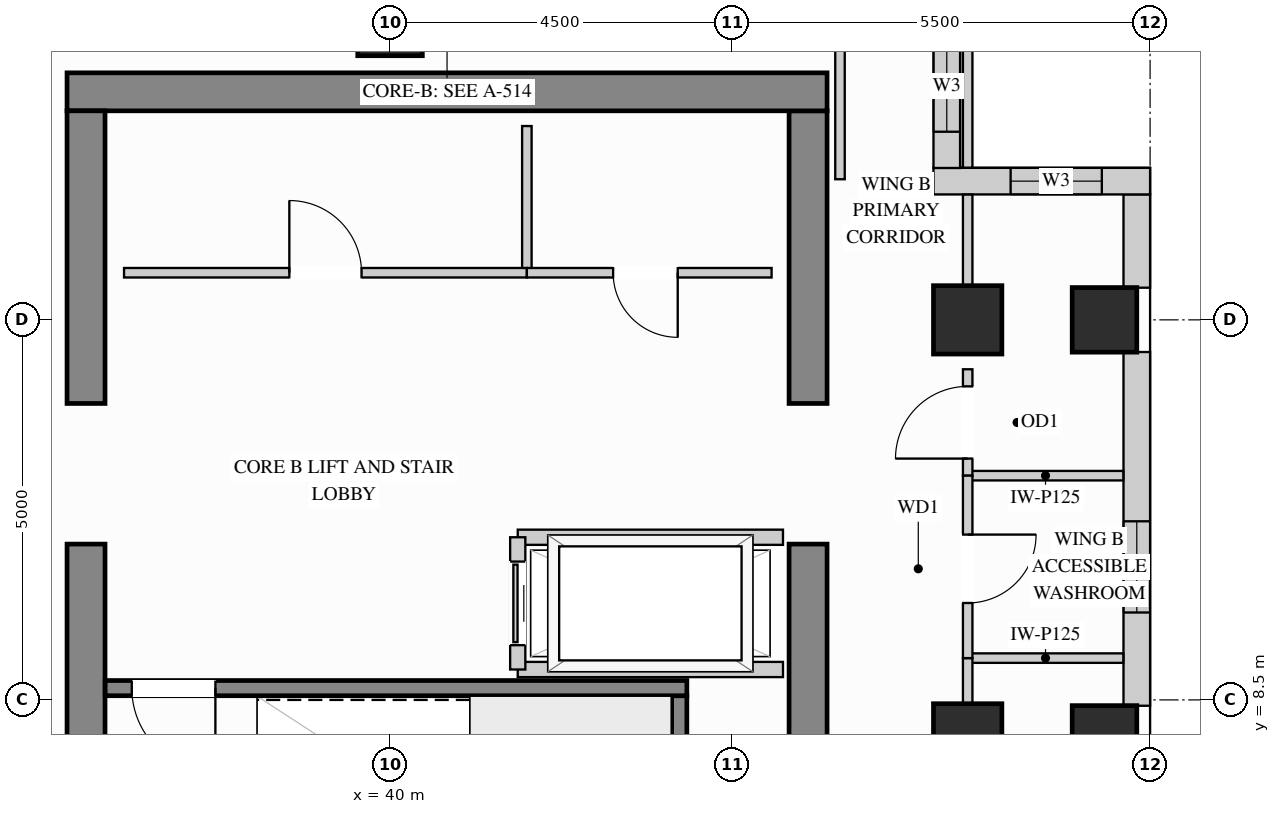
"""IFC4 building model, lengths in metres.
Left out: names, types, materials, properties, quantities, classifications, styles, units other than length and angle.
Written with IfcOpenShell. Run it as: python <this file> out.ifc"""

import sys

from ifc_helpers import new_model, si_unit, direction, frame, frame_2d, origin, origin_2d, place, context, subcontext, project, spatial, rectangle, extrude, source, transform, mapped, element, fill, save


model = new_model("IFC4")
c1 = context("Model", 3, precision=1e-05, world=origin(), true_north=direction((0.0, 1.0)))
c2 = subcontext(c1, "Body", "Model", "MODEL_VIEW")
j1 = project(units=[si_unit("LENGTHUNIT", "METRE"), si_unit("PLANEANGLEUNIT", "RADIAN")], contexts=[c1])
p1 = place(None, origin())
s1 = spatial("IfcSite", under=j1, at=p1, CompositionType="ELEMENT")
p2 = place(p1, origin())
s2 = spatial("IfcBuilding", under=s1, at=p2, CompositionType="ELEMENT")
p3 = place(p2, frame((0.0, 0.0, 219.6)))
s3 = spatial("IfcBuildingStorey", under=s2, at=p3, CompositionType="ELEMENT", Elevation=219.6)
m1 = source(origin(), c2, "Body", "SweptSolid", [
    extrude(rectangle(XDim=0.9, YDim=0.9, at=origin_2d()), origin(), (0.0, 0.0, 1.0), 3.4),
])
for number, where, z_axis, x_axis in (
    (1, (47.6, 13.5, 0.0), (0.0, 0.0, 1.0), (1.0, 0.0, 0.0)),
    (2, (47.6, 8.0, 0.0), (0.0, 0.0, 1.0), (1.0, 0.0, 0.0)),
):
    element("IfcColumn", number, at=place(p3, frame(where, z_axis=z_axis, x_axis=x_axis)), inside=s3, PredefinedType="COLUMN", context=c2, shape_type="MappedRepresentation", body=[
        mapped(m1, transform((0.0, 0.0, 0.0), x_axis=(1.0, 0.0, 0.0), y_axis=(0.0, 1.0, 0.0), z_axis=(0.0, 0.0, 1.0))),
    ])
m2 = source(origin(), c2, "Body", "SweptSolid", [
    extrude(rectangle(XDim=0.85, YDim=0.85, at=origin_2d()), origin(), (0.0, 0.0, 1.0), 3.4),
])
for number, where, z_axis, x_axis in (
    (3, (40.0, 17.4, 0.0), (0.0, 0.0, 1.0), (1.0, 0.0, 0.0)),
    (4, (49.4, 13.5, 0.0), (0.0, 0.0, 1.0), (1.0, 0.0, 0.0)),
    (5, (49.4, 8.0, 0.0), (0.0, 0.0, 1.0), (1.0, 0.0, 0.0)),
):
    element("IfcColumn", number, at=place(p3, frame(where, z_axis=z_axis, x_axis=x_axis)), inside=s3, PredefinedType="COLUMN", context=c2, shape_type="MappedRepresentation", body=[
        mapped(m2, transform((0.0, 0.0, 0.0), x_axis=(1.0, 0.0, 0.0), y_axis=(0.0, 1.0, 0.0), z_axis=(0.0, 0.0, 1.0))),
    ])
m3 = source(origin(), c2, "Body", "SweptSolid", [
    extrude(rectangle(XDim=5.8, YDim=0.5, at=frame_2d((2.9, 0.0))), origin(), (0.0, 0.0, 1.0), 3.4),
])
p4 = place(p3, frame((45.5, 4.75, 0.0), z_axis=(0.0, 0.0, 1.0), x_axis=(0.0, 1.0, 0.0)))
e6 = element("IfcWall", 6, at=p4, inside=s3, PredefinedType="SHEAR", context=c2, shape_type="MappedRepresentation", body=[
    mapped(m3, transform((0.0, 0.0, 0.0), x_axis=(1.0, 0.0, 0.0), y_axis=(0.0, 1.0, 0.0), z_axis=(0.0, 0.0, 1.0))),
])
m4 = source(origin(), c2, "Body", "SweptSolid", [
    extrude(rectangle(XDim=3.85, YDim=0.5, at=frame_2d((1.925, 0.0))), origin(), (0.0, 0.0, 1.0), 3.4),
])
p5 = place(p3, frame((45.5, 12.4, 0.0), z_axis=(0.0, 0.0, 1.0), x_axis=(0.0, 1.0, 0.0)))
e7 = element("IfcWall", 7, at=p5, inside=s3, PredefinedType="SHEAR", context=c2, shape_type="MappedRepresentation", body=[
    mapped(m4, transform((0.0, 0.0, 0.0), x_axis=(1.0, 0.0, 0.0), y_axis=(0.0, 1.0, 0.0), z_axis=(0.0, 0.0, 1.0))),
])
m5 = source(origin(), c2, "Body", "SweptSolid", [
    extrude(rectangle(XDim=10.0, YDim=0.5, at=frame_2d((5.0, 0.0))), origin(), (0.0, 0.0, 1.0), 3.4),
])
p6 = place(p3, frame((35.75, 16.5, 0.0), z_axis=(0.0, 0.0, 1.0), x_axis=(1.0, 0.0, 0.0)))
e8 = element("IfcWall", 8, at=p6, inside=s3, PredefinedType="SHEAR", context=c2, shape_type="MappedRepresentation", body=[
    mapped(m5, transform((0.0, 0.0, 0.0), x_axis=(1.0, 0.0, 0.0), y_axis=(0.0, 1.0, 0.0), z_axis=(0.0, 0.0, 1.0))),
])
p7 = place(p3, frame((36.0, 4.75, 0.0), z_axis=(0.0, 0.0, 1.0), x_axis=(0.0, 1.0, 0.0)))
e9 = element("IfcWall", 9, at=p7, inside=s3, PredefinedType="SHEAR", context=c2, shape_type="MappedRepresentation", body=[
    mapped(m3, transform((0.0, 0.0, 0.0), x_axis=(1.0, 0.0, 0.0), y_axis=(0.0, 1.0, 0.0), z_axis=(0.0, 0.0, 1.0))),
])
p8 = place(p3, frame((36.0, 12.4, 0.0), z_axis=(0.0, 0.0, 1.0), x_axis=(0.0, 1.0, 0.0)))
e10 = element("IfcWall", 10, at=p8, inside=s3, PredefinedType="SHEAR", context=c2, shape_type="MappedRepresentation", body=[
    mapped(m4, transform((0.0, 0.0, 0.0), x_axis=(1.0, 0.0, 0.0), y_axis=(0.0, 1.0, 0.0), z_axis=(0.0, 0.0, 1.0))),
])
p9 = place(p3, frame((49.825, 8.423, 0.0), z_axis=(0.0, 0.0, 1.0), x_axis=(0.0, 1.0, 0.0)))
e11 = element("IfcWall", 11, at=p9, inside=s3, PredefinedType="SOLIDWALL", context=c2, shape_type="SweptSolid", body=[
    extrude(rectangle(XDim=4.654, YDim=0.35, at=frame_2d((2.327, 0.0))), origin(), (0.0, 0.0, 1.0), 3.385),
])
p10 = place(p9, frame((1.227, 0.0, 0.78)))
e12 = element("IfcOpeningElement", 12, at=p10, cuts=e11, PredefinedType="OPENING", context=c2, shape_type="SweptSolid", body=[
    extrude(rectangle(XDim=1.2, YDim=2.1, at=frame_2d((0.6, 1.05))), frame((0.0, 0.185, 0.0), z_axis=(0.0, -1.0, 0.0), x_axis=(1.0, 0.0, 0.0)), (0.0, 0.0, 1.0), 0.37),
])
m6 = source(origin(), c2, "Body", "SweptSolid", [
    extrude(rectangle(XDim=1.229, YDim=0.35, at=frame_2d((0.615, 0.0))), origin(), (0.0, 0.0, 1.0), 3.385),
])
p11 = place(p3, frame((49.825, 13.923, 0.0), z_axis=(0.0, 0.0, 1.0), x_axis=(0.0, 1.0, 0.0)))
e13 = element("IfcWall", 13, at=p11, inside=s3, PredefinedType="SOLIDWALL", context=c2, shape_type="MappedRepresentation", body=[
    mapped(m6, transform((0.0, 0.0, 0.0), x_axis=(1.0, 0.0, 0.0), y_axis=(0.0, 1.0, 0.0), z_axis=(0.0, 0.0, 1.0))),
])
p12 = place(p3, frame((50.0, 15.325, 0.0), z_axis=(0.0, 0.0, 1.0), x_axis=(-1.0, 0.0, 0.0)))
e14 = element("IfcWall", 14, at=p12, inside=s3, PredefinedType="SOLIDWALL", context=c2, shape_type="SweptSolid", body=[
    extrude(rectangle(XDim=2.85, YDim=0.35, at=frame_2d((1.425, 0.0))), origin(), (0.0, 0.0, 1.0), 3.385),
])
p13 = place(p12, frame((0.635, 0.0, 0.78)))
e15 = element("IfcOpeningElement", 15, at=p13, cuts=e14, PredefinedType="OPENING", context=c2, shape_type="SweptSolid", body=[
    extrude(rectangle(XDim=1.2, YDim=2.1, at=frame_2d((0.6, 1.05))), frame((0.0, 0.185, 0.0), z_axis=(0.0, -1.0, 0.0), x_axis=(1.0, 0.0, 0.0)), (0.0, 0.0, 1.0), 0.37),
])
p14 = place(p3, frame((47.325, 15.498, 0.0), z_axis=(0.0, 0.0, 1.0), x_axis=(0.0, 1.0, 0.0)))
e16 = element("IfcWall", 16, at=p14, inside=s3, PredefinedType="SOLIDWALL", context=c2, shape_type="SweptSolid", body=[
    extrude(rectangle(XDim=2.154, YDim=0.35, at=frame_2d((1.077, 0.0))), origin(), (0.0, 0.0, 1.0), 3.385),
])
p15 = place(p14, frame((0.477, 0.0, 0.78)))
e17 = element("IfcOpeningElement", 17, at=p15, cuts=e16, PredefinedType="OPENING", context=c2, shape_type="SweptSolid", body=[
    extrude(rectangle(XDim=1.2, YDim=2.1, at=frame_2d((0.6, 1.05))), frame((0.0, 0.185, 0.0), z_axis=(0.0, -1.0, 0.0), x_axis=(1.0, 0.0, 0.0)), (0.0, 0.0, 1.0), 0.37),
])
m7 = source(origin(), c2, "Body", "SweptSolid", [
    extrude(rectangle(XDim=1.93, YDim=0.125, at=frame_2d((0.965, 0.0))), origin(), (0.0, 0.0, 1.0), 3.385),
])
p16 = place(p3, frame((41.8, 14.12, 0.0), z_axis=(0.0, 0.0, 1.0), x_axis=(0.0, 1.0, 0.0)))
e18 = element("IfcWall", 18, at=p16, inside=s3, PredefinedType="PARTITIONING", context=c2, shape_type="MappedRepresentation", body=[
    mapped(m7, transform((0.0, 0.0, 0.0), x_axis=(1.0, 0.0, 0.0), y_axis=(0.0, 1.0, 0.0), z_axis=(0.0, 0.0, 1.0))),
])
p17 = place(p3, frame((36.5, 14.12, 0.0), z_axis=(0.0, 0.0, 1.0), x_axis=(1.0, 0.0, 0.0)))
e19 = element("IfcWall", 19, at=p17, inside=s3, PredefinedType="PARTITIONING", context=c2, shape_type="SweptSolid", body=[
    extrude(rectangle(XDim=5.3, YDim=0.125, at=frame_2d((2.65, 0.0))), origin(), (0.0, 0.0, 1.0), 3.385),
])
p18 = place(p17, frame((2.175, 0.0, 0.0)))
e20 = element("IfcOpeningElement", 20, at=p18, cuts=e19, PredefinedType="OPENING", context=c2, shape_type="SweptSolid", body=[
    extrude(rectangle(XDim=0.95, YDim=2.15, at=frame_2d((0.475, 1.075))), frame((0.0, 0.073, 0.0), z_axis=(0.0, -1.0, 0.0), x_axis=(1.0, 0.0, 0.0)), (0.0, 0.0, 1.0), 0.145),
])
p19 = place(p3, frame((41.8, 14.12, 0.0), z_axis=(0.0, 0.0, 1.0), x_axis=(1.0, 0.0, 0.0)))
e21 = element("IfcWall", 21, at=p19, inside=s3, PredefinedType="PARTITIONING", context=c2, shape_type="SweptSolid", body=[
    extrude(rectangle(XDim=3.22, YDim=0.125, at=frame_2d((1.61, 0.0))), origin(), (0.0, 0.0, 1.0), 3.385),
])
p20 = place(p19, frame((1.135, 0.0, 0.0)))
e22 = element("IfcOpeningElement", 22, at=p20, cuts=e21, PredefinedType="OPENING", context=c2, shape_type="SweptSolid", body=[
    extrude(rectangle(XDim=0.85, YDim=2.1, at=frame_2d((0.425, 1.05))), frame((0.0, 0.073, 0.0), z_axis=(0.0, -1.0, 0.0), x_axis=(1.0, 0.0, 0.0)), (0.0, 0.0, 1.0), 0.145),
])
m8 = source(origin(), c2, "Body", "SweptSolid", [
    extrude(rectangle(XDim=2.048, YDim=0.125, at=frame_2d((1.024, 0.0))), origin(), (0.0, 0.0, 1.0), 3.385),
])
for number, where, z_axis, x_axis in (
    (23, (47.6, 11.45, 0.0), (0.0, 0.0, 1.0), (1.0, 0.0, 0.0)),
    (24, (47.6, 9.05, 0.0), (0.0, 0.0, 1.0), (1.0, 0.0, 0.0)),
):
    element("IfcWall", number, at=place(p3, frame(where, z_axis=z_axis, x_axis=x_axis)), inside=s3, PredefinedType="PARTITIONING", context=c2, shape_type="MappedRepresentation", body=[
        mapped(m8, transform((0.0, 0.0, 0.0), x_axis=(1.0, 0.0, 0.0), y_axis=(0.0, 1.0, 0.0), z_axis=(0.0, 0.0, 1.0))),
    ])
m9 = source(origin(), c2, "Body", "SweptSolid", [
    extrude(rectangle(XDim=0.6, YDim=0.125, at=frame_2d((0.3, 0.0))), origin(), (0.0, 0.0, 1.0), 2.773),
])
p21 = place(p3, frame((47.6, 8.45, 0.0), z_axis=(0.0, 0.0, 1.0), x_axis=(0.0, 1.0, 0.0)))
e25 = element("IfcWall", 25, at=p21, inside=s3, PredefinedType="PARTITIONING", context=c2, shape_type="MappedRepresentation", body=[
    mapped(m9, transform((0.0, 0.0, 0.0), x_axis=(1.0, 0.0, 0.0), y_axis=(0.0, 1.0, 0.0), z_axis=(0.0, 0.0, 1.0))),
])
p22 = place(p3, frame((47.6, 11.45, 0.0), z_axis=(0.0, 0.0, 1.0), x_axis=(0.0, 1.0, 0.0)))
e26 = element("IfcWall", 26, at=p22, inside=s3, PredefinedType="PARTITIONING", context=c2, shape_type="SweptSolid", body=[
    extrude(rectangle(XDim=1.4, YDim=0.125, at=frame_2d((0.7, 0.0))), origin(), (0.0, 0.0, 1.0), 2.773),
])
p23 = place(p22, frame((0.225, 0.0, 0.0)))
e27 = element("IfcOpeningElement", 27, at=p23, cuts=e26, PredefinedType="OPENING", context=c2, shape_type="SweptSolid", body=[
    extrude(rectangle(XDim=0.95, YDim=2.15, at=frame_2d((0.475, 1.075))), frame((0.0, 0.073, 0.0), z_axis=(0.0, -1.0, 0.0), x_axis=(1.0, 0.0, 0.0)), (0.0, 0.0, 1.0), 0.145),
])
m10 = source(origin(), c2, "Body", "SweptSolid", [
    extrude(rectangle(XDim=1.198, YDim=0.125, at=frame_2d((0.599, 0.0))), origin(), (0.0, 0.0, 1.0), 3.385),
])
p24 = place(p3, frame((47.6, 13.95, 0.0), z_axis=(0.0, 0.0, 1.0), x_axis=(0.0, 1.0, 0.0)))
e28 = element("IfcWall", 28, at=p24, inside=s3, PredefinedType="PARTITIONING", context=c2, shape_type="MappedRepresentation", body=[
    mapped(m10, transform((0.0, 0.0, 0.0), x_axis=(1.0, 0.0, 0.0), y_axis=(0.0, 1.0, 0.0), z_axis=(0.0, 0.0, 1.0))),
])
m11 = source(origin(), c2, "Body", "SweptSolid", [
    extrude(rectangle(XDim=2.148, YDim=0.125, at=frame_2d((1.074, 0.0))), origin(), (0.0, 0.0, 1.0), 3.385),
])
p25 = place(p3, frame((47.6, 15.502, 0.0), z_axis=(0.0, 0.0, 1.0), x_axis=(0.0, 1.0, 0.0)))
e29 = element("IfcWall", 29, at=p25, inside=s3, PredefinedType="PARTITIONING", context=c2, shape_type="MappedRepresentation", body=[
    mapped(m11, transform((0.0, 0.0, 0.0), x_axis=(1.0, 0.0, 0.0), y_axis=(0.0, 1.0, 0.0), z_axis=(0.0, 0.0, 1.0))),
])
p26 = place(p3, frame((47.6, 9.05, 0.0), z_axis=(0.0, 0.0, 1.0), x_axis=(0.0, 1.0, 0.0)))
e30 = element("IfcWall", 30, at=p26, inside=s3, PredefinedType="PARTITIONING", context=c2, shape_type="SweptSolid", body=[
    extrude(rectangle(XDim=2.4, YDim=0.125, at=frame_2d((1.2, 0.0))), origin(), (0.0, 0.0, 1.0), 2.773),
])
p27 = place(p26, frame((0.725, 0.0, 0.0)))
e31 = element("IfcOpeningElement", 31, at=p27, cuts=e30, PredefinedType="OPENING", context=c2, shape_type="SweptSolid", body=[
    extrude(rectangle(XDim=0.9, YDim=2.15, at=frame_2d((0.45, 1.075))), frame((0.0, 0.073, 0.0), z_axis=(0.0, -1.0, 0.0), x_axis=(1.0, 0.0, 0.0)), (0.0, 0.0, 1.0), 0.145),
])
m12 = source(origin(), c2, "Body", "SweptSolid", [
    extrude(rectangle(XDim=2.298, YDim=0.125, at=frame_2d((1.149, 0.0))), origin(), (0.0, 0.0, 1.0), 3.385),
])
p28 = place(p3, frame((45.92, 15.35, 0.0), z_axis=(0.0, 0.0, 1.0), x_axis=(0.0, 1.0, 0.0)))
e32 = element("IfcWall", 32, at=p28, inside=s3, PredefinedType="PARTITIONING", context=c2, shape_type="MappedRepresentation", body=[
    mapped(m12, transform((0.0, 0.0, 0.0), x_axis=(1.0, 0.0, 0.0), y_axis=(0.0, 1.0, 0.0), z_axis=(0.0, 0.0, 1.0))),
])
m13 = source(origin(), c2, "Body", "SweptSolid", [
    extrude(rectangle(XDim=3.49, YDim=0.2, at=frame_2d((1.745, 0.0))), origin(), (0.0, 0.0, 1.0), 3.385),
])
for number, where, z_axis, x_axis in (
    (33, (41.68, 10.64, 0.0), (0.0, 0.0, 1.0), (1.0, 0.0, 0.0)),
    (34, (41.68, 8.9, 0.0), (0.0, 0.0, 1.0), (1.0, 0.0, 0.0)),
):
    element("IfcWall", number, at=place(p3, frame(where, z_axis=z_axis, x_axis=x_axis)), inside=s3, PredefinedType="PARTITIONING", context=c2, shape_type="MappedRepresentation", body=[
        mapped(m13, transform((0.0, 0.0, 0.0), x_axis=(1.0, 0.0, 0.0), y_axis=(0.0, 1.0, 0.0), z_axis=(0.0, 0.0, 1.0))),
    ])
p29 = place(p3, frame((41.68, 8.9, 0.0), z_axis=(0.0, 0.0, 1.0), x_axis=(0.0, 1.0, 0.0)))
e35 = element("IfcWall", 35, at=p29, inside=s3, PredefinedType="PARTITIONING", context=c2, shape_type="SweptSolid", body=[
    extrude(rectangle(XDim=1.74, YDim=0.2, at=frame_2d((0.87, 0.0))), origin(), (0.0, 0.0, 1.0), 3.385),
])
p30 = place(p29, frame((0.32, 0.0, 0.0)))
e36 = element("IfcOpeningElement", 36, at=p30, cuts=e35, PredefinedType="OPENING", context=c2, shape_type="SweptSolid", body=[
    extrude(rectangle(XDim=1.1, YDim=2.2, at=frame_2d((0.55, 1.1))), frame((0.0, 0.11, 0.0), z_axis=(0.0, -1.0, 0.0), x_axis=(1.0, 0.0, 0.0)), (0.0, 0.0, 1.0), 0.22),
])
m14 = source(origin(), c2, "Body", "SweptSolid", [
    extrude(rectangle(XDim=3.803, YDim=0.2, at=frame_2d((1.901, 0.0))), origin(), (0.0, 0.0, 1.0), 3.4),
])
p31 = place(p3, frame((43.805, 4.752, 0.0), z_axis=(0.0, 0.0, 1.0), x_axis=(0.0, 1.0, 0.0)))
e37 = element("IfcWall", 37, at=p31, inside=s3, PredefinedType="SHEAR", context=c2, shape_type="MappedRepresentation", body=[
    mapped(m14, transform((0.0, 0.0, 0.0), x_axis=(1.0, 0.0, 0.0), y_axis=(0.0, 1.0, 0.0), z_axis=(0.0, 0.0, 1.0))),
])
p32 = place(p3, frame((36.252, 8.655, 0.0), z_axis=(0.0, 0.0, 1.0), x_axis=(1.0, 0.0, 0.0)))
e38 = element("IfcWall", 38, at=p32, inside=s3, PredefinedType="SHEAR", context=c2, shape_type="SweptSolid", body=[
    extrude(rectangle(XDim=7.653, YDim=0.2, at=frame_2d((3.827, 0.0))), origin(), (0.0, 0.0, 1.0), 3.4),
])
p33 = place(p32, frame((0.35, 0.0, 0.0)))
e39 = element("IfcOpeningElement", 39, at=p33, cuts=e38, PredefinedType="OPENING", context=c2, shape_type="SweptSolid", body=[
    extrude(rectangle(XDim=1.1, YDim=2.15, at=frame_2d((0.55, 1.075))), frame((0.0, 0.11, 0.0), z_axis=(0.0, -1.0, 0.0), x_axis=(1.0, 0.0, 0.0)), (0.0, 0.0, 1.0), 0.22),
])
m15 = source(origin(), c2, "Body", "SweptSolid", [
    extrude(rectangle(XDim=1.1, YDim=2.2, at=frame_2d((0.55, 1.1))), frame((0.0, 0.025, 0.0), z_axis=(0.0, -1.0, 0.0), x_axis=(1.0, 0.0, 0.0)), (0.0, 0.0, 1.0), 0.05),
])
p34 = place(p30, origin())
e40 = element("IfcDoor", 40, at=p34, inside=s3, OperationType="SLIDING_TO_LEFT", PredefinedType="DOOR", context=c2, shape_type="MappedRepresentation", body=[
    mapped(m15, transform((0.0, 0.0, 0.0), x_axis=(1.0, 0.0, 0.0), y_axis=(0.0, 1.0, 0.0), z_axis=(0.0, 0.0, 1.0))),
])
fill(e36, e40)
m16 = source(origin(), c2, "Body", "SweptSolid", [
    extrude(rectangle(XDim=0.95, YDim=2.15, at=frame_2d((0.475, 1.075))), frame((0.0, 0.025, 0.0), z_axis=(0.0, -1.0, 0.0), x_axis=(1.0, 0.0, 0.0)), (0.0, 0.0, 1.0), 0.05),
])
p35 = place(p18, origin())
e41 = element("IfcDoor", 41, at=p35, inside=s3, OperationType="SINGLE_SWING_LEFT", PredefinedType="DOOR", context=c2, shape_type="MappedRepresentation", body=[
    mapped(m16, transform((0.0, 0.0, 0.0), x_axis=(1.0, 0.0, 0.0), y_axis=(0.0, 1.0, 0.0), z_axis=(0.0, 0.0, 1.0))),
])
fill(e20, e41)
p36 = place(p23, origin())
e42 = element("IfcDoor", 42, at=p36, inside=s3, OperationType="SINGLE_SWING_LEFT", PredefinedType="DOOR", context=c2, shape_type="MappedRepresentation", body=[
    mapped(m16, transform((0.0, 0.0, 0.0), x_axis=(1.0, 0.0, 0.0), y_axis=(0.0, 1.0, 0.0), z_axis=(0.0, 0.0, 1.0))),
])
fill(e27, e42)
m17 = source(origin(), c2, "Body", "SweptSolid", [
    extrude(rectangle(XDim=0.85, YDim=2.1, at=frame_2d((0.425, 1.05))), frame((0.0, 0.025, 0.0), z_axis=(0.0, -1.0, 0.0), x_axis=(1.0, 0.0, 0.0)), (0.0, 0.0, 1.0), 0.05),
])
p37 = place(p20, origin())
e43 = element("IfcDoor", 43, at=p37, inside=s3, OperationType="SINGLE_SWING_RIGHT", PredefinedType="DOOR", context=c2, shape_type="MappedRepresentation", body=[
    mapped(m17, transform((0.0, 0.0, 0.0), x_axis=(1.0, 0.0, 0.0), y_axis=(0.0, 1.0, 0.0), z_axis=(0.0, 0.0, 1.0))),
])
fill(e22, e43)
m18 = source(origin(), c2, "Body", "SweptSolid", [
    extrude(rectangle(XDim=1.1, YDim=2.15, at=frame_2d((0.55, 1.075))), frame((0.0, 0.025, 0.0), z_axis=(0.0, -1.0, 0.0), x_axis=(1.0, 0.0, 0.0)), (0.0, 0.0, 1.0), 0.05),
])
p38 = place(p33, origin())
e44 = element("IfcDoor", 44, at=p38, inside=s3, OperationType="SINGLE_SWING_RIGHT", PredefinedType="DOOR", context=c2, shape_type="MappedRepresentation", body=[
    mapped(m18, transform((0.0, 0.0, 0.0), x_axis=(1.0, 0.0, 0.0), y_axis=(0.0, 1.0, 0.0), z_axis=(0.0, 0.0, 1.0))),
])
fill(e39, e44)
m19 = source(origin(), c2, "Body", "SweptSolid", [
    extrude(rectangle(XDim=0.9, YDim=2.15, at=frame_2d((0.45, 1.075))), frame((0.0, 0.025, 0.0), z_axis=(0.0, -1.0, 0.0), x_axis=(1.0, 0.0, 0.0)), (0.0, 0.0, 1.0), 0.05),
])
p39 = place(p27, origin())
e45 = element("IfcDoor", 45, at=p39, inside=s3, OperationType="SINGLE_SWING_RIGHT", PredefinedType="DOOR", context=c2, shape_type="MappedRepresentation", body=[
    mapped(m19, transform((0.0, 0.0, 0.0), x_axis=(1.0, 0.0, 0.0), y_axis=(0.0, 1.0, 0.0), z_axis=(0.0, 0.0, 1.0))),
])
fill(e31, e45)
m20 = source(origin(), c2, "Body", "SweptSolid", [
    extrude(rectangle(XDim=1.2, YDim=2.1, at=frame_2d((0.6, 1.05))), frame((0.0, 0.03, 0.0), z_axis=(0.0, -1.0, 0.0), x_axis=(1.0, 0.0, 0.0)), (0.0, 0.0, 1.0), 0.06),
])
p40 = place(p10, origin())
e46 = element("IfcWindow", 46, at=p40, inside=s3, PartitioningType="SINGLE_PANEL", PredefinedType="WINDOW", context=c2, shape_type="MappedRepresentation", body=[
    mapped(m20, transform((0.0, 0.0, 0.0), x_axis=(1.0, 0.0, 0.0), y_axis=(0.0, 1.0, 0.0), z_axis=(0.0, 0.0, 1.0))),
])
fill(e12, e46)
p41 = place(p13, origin())
e47 = element("IfcWindow", 47, at=p41, inside=s3, PartitioningType="SINGLE_PANEL", PredefinedType="WINDOW", context=c2, shape_type="MappedRepresentation", body=[
    mapped(m20, transform((0.0, 0.0, 0.0), x_axis=(1.0, 0.0, 0.0), y_axis=(0.0, 1.0, 0.0), z_axis=(0.0, 0.0, 1.0))),
])
fill(e15, e47)
p42 = place(p15, origin())
e48 = element("IfcWindow", 48, at=p42, inside=s3, PartitioningType="SINGLE_PANEL", PredefinedType="WINDOW", context=c2, shape_type="MappedRepresentation", body=[
    mapped(m20, transform((0.0, 0.0, 0.0), x_axis=(1.0, 0.0, 0.0), y_axis=(0.0, 1.0, 0.0), z_axis=(0.0, 0.0, 1.0))),
])
fill(e17, e48)
save(model, sys.argv[1])
